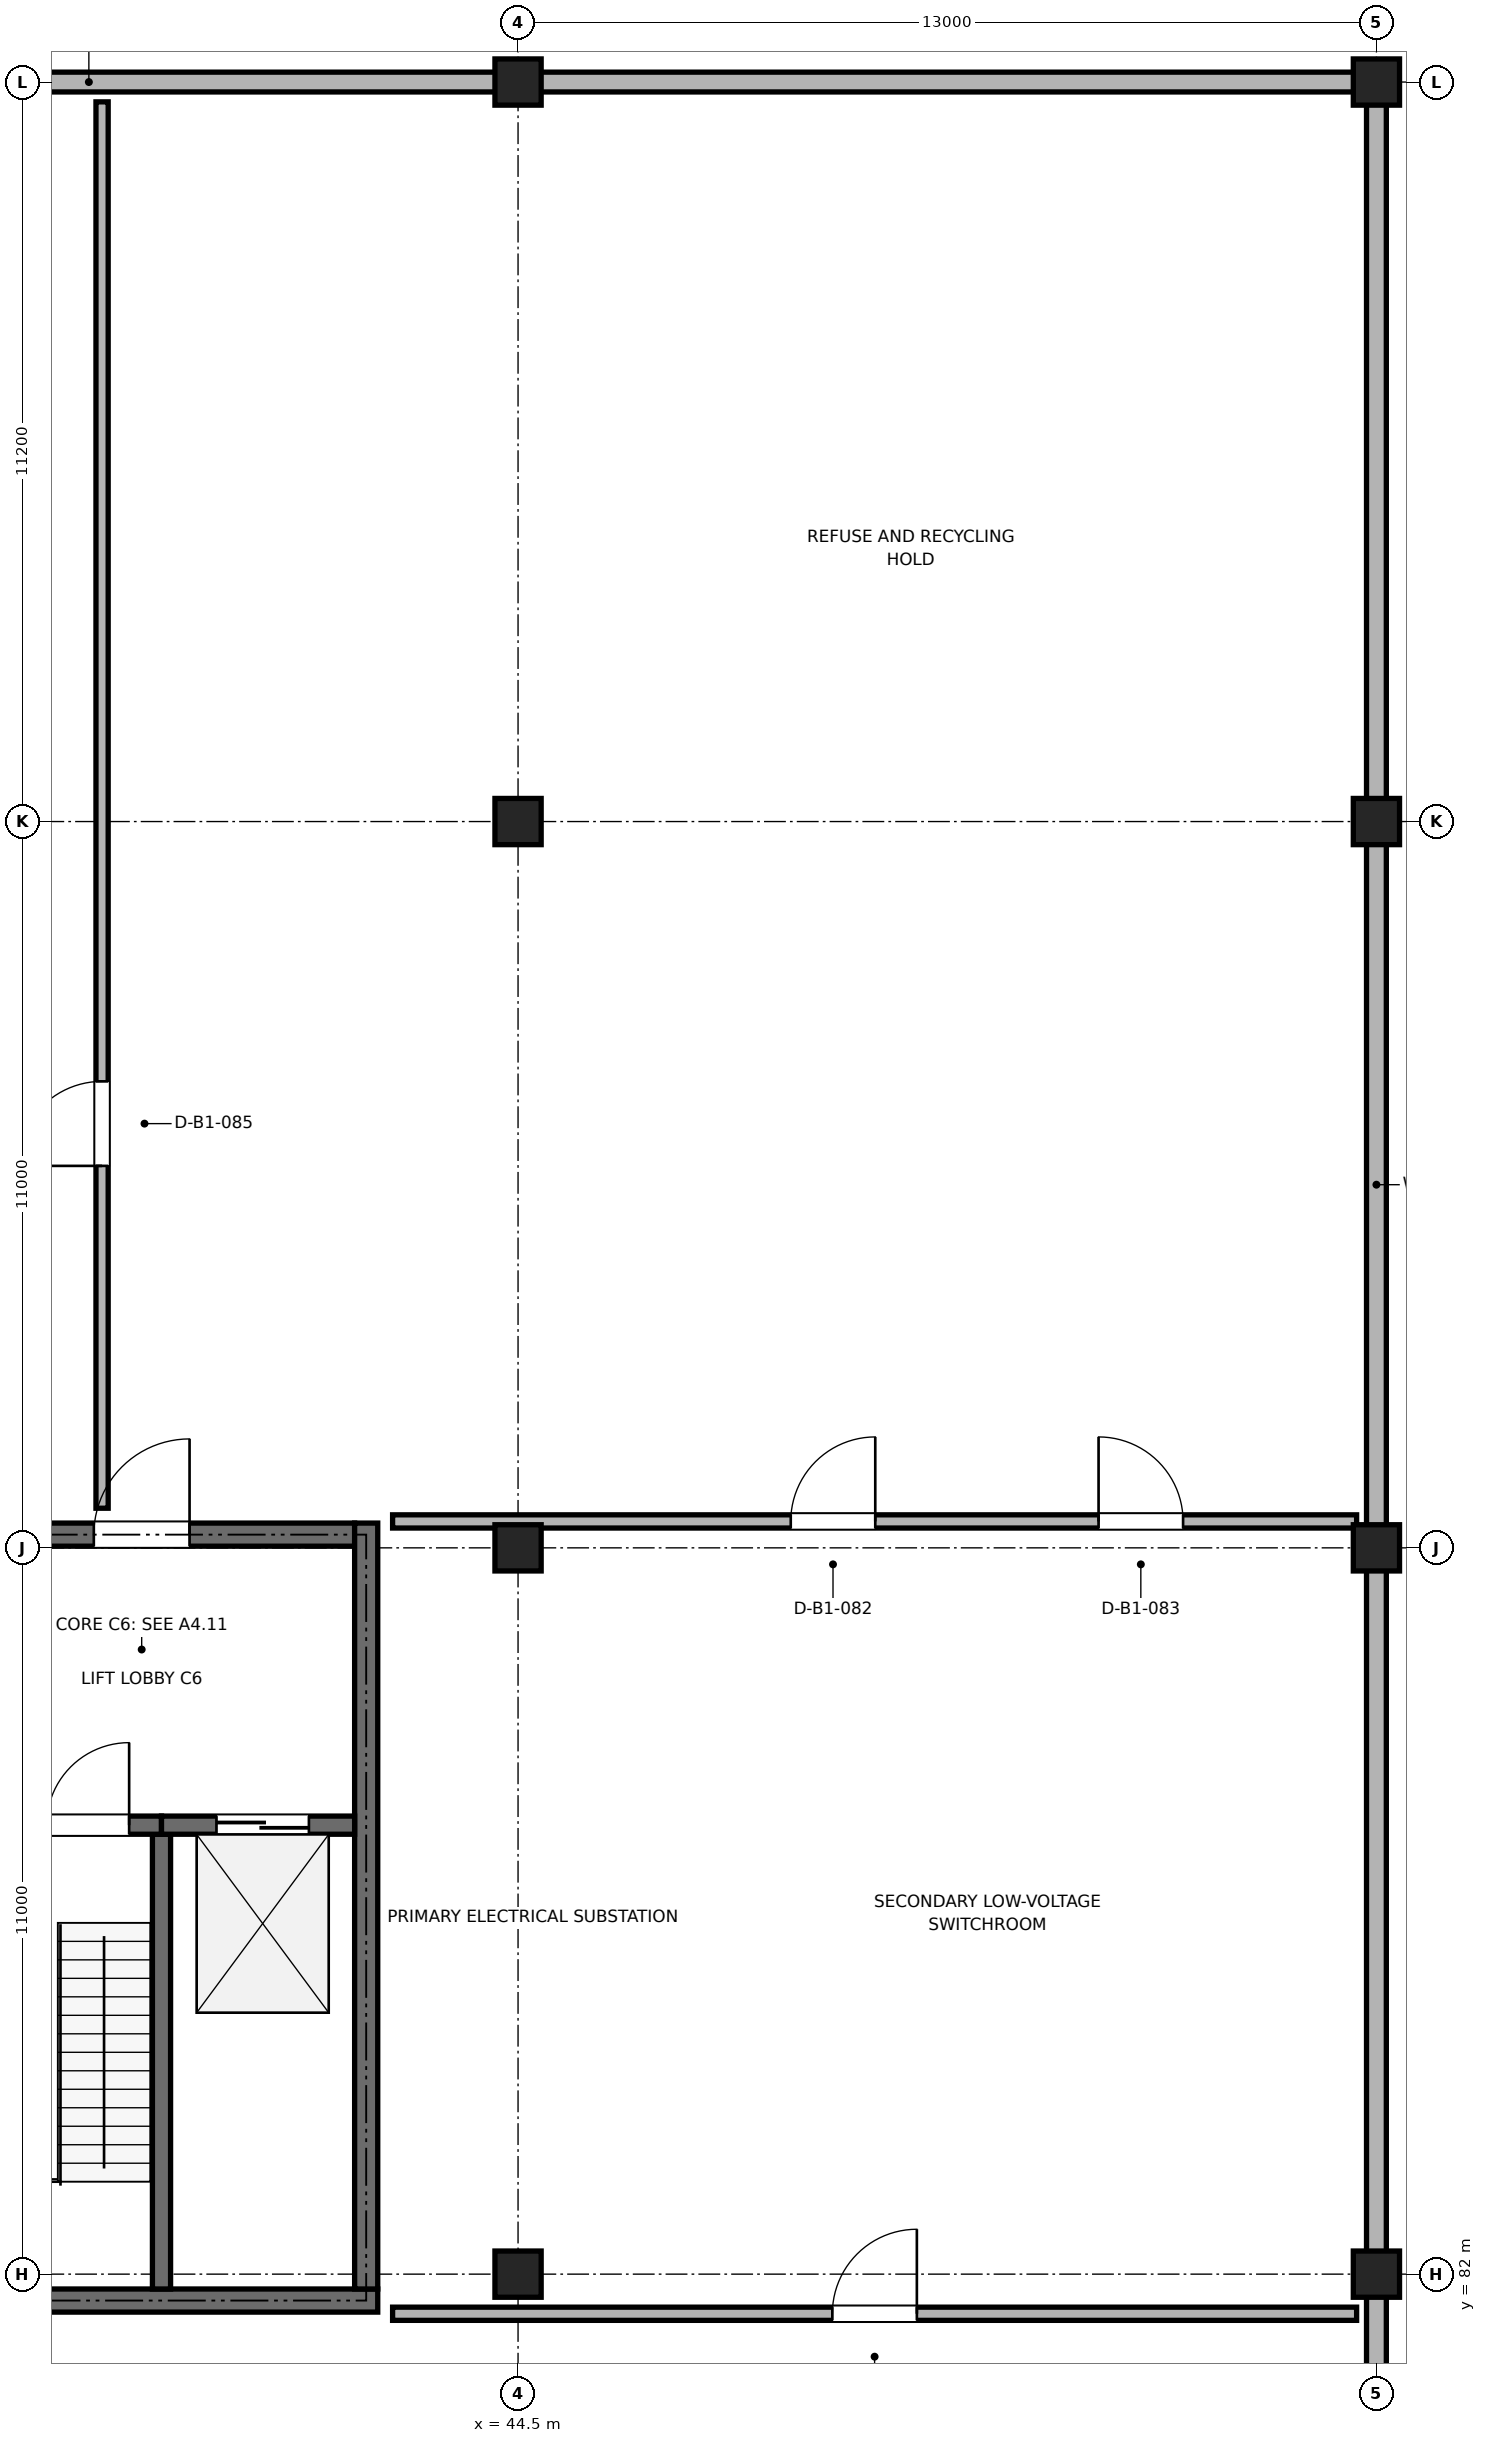
"""IFC4 building model, lengths in metres.
Left out: names, types, materials, properties, quantities, classifications, styles, units other than length and angle.
Written with IfcOpenShell. Run it as: python <this file> out.ifc"""

import sys

from ifc_helpers import new_model, si_unit, direction, frame, frame_2d, origin, origin_2d, place, context, subcontext, project, spatial, rectangle, extrude, element, fill, save


model = new_model("IFC4")
c1 = context("Model", 3, precision=1e-05, world=origin(), true_north=direction((0.0, 1.0)))
c2 = subcontext(c1, "Body", "Model", "MODEL_VIEW")
j1 = project(units=[si_unit("LENGTHUNIT", "METRE"), si_unit("PLANEANGLEUNIT", "RADIAN")], contexts=[c1])
p1 = place(None, origin())
s1 = spatial("IfcSite", under=j1, at=p1, CompositionType="ELEMENT")
p2 = place(p1, origin())
s2 = spatial("IfcBuilding", under=s1, at=p2, CompositionType="ELEMENT")
p3 = place(p2, frame((0.0, 0.0, -4.8)))
s3 = spatial("IfcBuildingStorey", under=s2, at=p3, CompositionType="ELEMENT", Elevation=-4.8)
for number, where, z_axis, x_axis in (
    (1, (44.5, 82.0, 0.0), (0.0, 0.0, 1.0), (1.0, 0.0, 0.0)),
    (2, (44.5, 93.0, 0.0), (0.0, 0.0, 1.0), (1.0, 0.0, 0.0)),
    (3, (44.5, 104.0, 0.0), (0.0, 0.0, 1.0), (1.0, 0.0, 0.0)),
    (4, (44.5, 115.2, 0.0), (0.0, 0.0, 1.0), (1.0, 0.0, 0.0)),
    (5, (57.5, 82.0, 0.0), (0.0, 0.0, 1.0), (1.0, 0.0, 0.0)),
    (6, (57.5, 93.0, 0.0), (0.0, 0.0, 1.0), (1.0, 0.0, 0.0)),
    (7, (57.5, 104.0, 0.0), (0.0, 0.0, 1.0), (1.0, 0.0, 0.0)),
    (8, (57.5, 115.2, 0.0), (0.0, 0.0, 1.0), (1.0, 0.0, 0.0)),
):
    element("IfcColumn", number, at=place(p3, frame(where, z_axis=z_axis, x_axis=x_axis)), inside=s3, PredefinedType="COLUMN", context=c2, shape_type="SweptSolid", body=[
        extrude(rectangle(XDim=0.7, YDim=0.7, at=origin_2d()), origin(), (0.0, 0.0, 1.0), 4.8),
    ])
for number, where, z_axis, x_axis in (
    (9, (57.5, 81.98, 0.0), (0.0, 0.0, 1.0), (0.0, -1.0, 0.0)),
    (10, (57.5, 92.98, 0.0), (0.0, 0.0, 1.0), (0.0, -1.0, 0.0)),
    (11, (57.5, 103.98, 0.0), (0.0, 0.0, 1.0), (0.0, -1.0, 0.0)),
):
    element("IfcWall", number, at=place(p3, frame(where, z_axis=z_axis, x_axis=x_axis)), inside=s3, PredefinedType="SOLIDWALL", context=c2, shape_type="SweptSolid", body=[
        extrude(rectangle(XDim=10.96, YDim=0.3, at=frame_2d((5.48, 0.0))), origin(), (0.0, 0.0, 1.0), 3.638),
    ])
p4 = place(p3, frame((57.5, 115.18, 0.0), z_axis=(0.0, 0.0, 1.0), x_axis=(0.0, -1.0, 0.0)))
e12 = element("IfcWall", 12, at=p4, inside=s3, PredefinedType="SOLIDWALL", context=c2, shape_type="SweptSolid", body=[
    extrude(rectangle(XDim=11.16, YDim=0.3, at=frame_2d((5.58, 0.0))), origin(), (0.0, 0.0, 1.0), 3.638),
])
for number, where, z_axis, x_axis in (
    (13, (44.52, 115.2, 0.0), (0.0, 0.0, 1.0), (1.0, 0.0, 0.0)),
    (14, (31.52, 115.2, 0.0), (0.0, 0.0, 1.0), (1.0, 0.0, 0.0)),
):
    element("IfcWall", number, at=place(p3, frame(where, z_axis=z_axis, x_axis=x_axis)), inside=s3, PredefinedType="SOLIDWALL", context=c2, shape_type="SweptSolid", body=[
        extrude(rectangle(XDim=12.96, YDim=0.3, at=frame_2d((6.48, 0.0))), origin(), (0.0, 0.0, 1.0), 3.638),
    ])
p5 = place(p3, frame((35.225, 81.6, 0.0), z_axis=(0.0, 0.0, 1.0), x_axis=(1.0, 0.0, 0.0)))
e15 = element("IfcWall", 15, at=p5, inside=s3, PredefinedType="SHEAR", context=c2, shape_type="SweptSolid", body=[
    extrude(rectangle(XDim=7.15, YDim=0.35, at=frame_2d((3.575, 0.0))), origin(), (0.0, 0.0, 1.0), 4.5),
])
p6 = place(p3, frame((35.575, 93.2, 0.0), z_axis=(0.0, 0.0, 1.0), x_axis=(1.0, 0.0, 0.0)))
e16 = element("IfcWall", 16, at=p6, inside=s3, PredefinedType="SHEAR", context=c2, shape_type="SweptSolid", body=[
    extrude(rectangle(XDim=6.45, YDim=0.35, at=frame_2d((3.225, 0.0))), origin(), (0.0, 0.0, 1.0), 4.5),
])
p7 = place(p6, frame((2.5, 0.0, 0.0)))
e17 = element("IfcOpeningElement", 17, at=p7, cuts=e16, PredefinedType="OPENING", context=c2, shape_type="SweptSolid", body=[
    extrude(rectangle(XDim=1.45, YDim=2.2, at=frame_2d((0.725, 1.1))), frame((0.0, 0.185, 0.0), z_axis=(0.0, -1.0, 0.0), x_axis=(1.0, 0.0, 0.0)), (0.0, 0.0, 1.0), 0.37),
])
p8 = place(p3, frame((42.2, 81.775, 0.0), z_axis=(0.0, 0.0, 1.0), x_axis=(0.0, 1.0, 0.0)))
e18 = element("IfcWall", 18, at=p8, inside=s3, PredefinedType="SHEAR", context=c2, shape_type="SweptSolid", body=[
    extrude(rectangle(XDim=11.6, YDim=0.35, at=frame_2d((5.8, 0.0))), origin(), (0.0, 0.0, 1.0), 4.5),
])
p9 = place(p3, frame((39.1, 81.775, 0.0), z_axis=(0.0, 0.0, 1.0), x_axis=(0.0, 1.0, 0.0)))
e19 = element("IfcWall", 19, at=p9, inside=s3, PredefinedType="SHEAR", context=c2, shape_type="SweptSolid", body=[
    extrude(rectangle(XDim=6.888, YDim=0.275, at=frame_2d((3.444, 0.0))), origin(), (0.0, 0.0, 1.0), 4.5),
])
p10 = place(p3, frame((35.575, 88.8, 0.0), z_axis=(0.0, 0.0, 1.0), x_axis=(1.0, 0.0, 0.0)))
e20 = element("IfcWall", 20, at=p10, inside=s3, PredefinedType="SHEAR", context=c2, shape_type="SweptSolid", body=[
    extrude(rectangle(XDim=3.525, YDim=0.275, at=frame_2d((1.763, 0.0))), origin(), (0.0, 0.0, 1.0), 4.5),
])
p11 = place(p10, frame((1.785, 0.0, 0.0)))
e21 = element("IfcOpeningElement", 21, at=p11, cuts=e20, PredefinedType="OPENING", context=c2, shape_type="SweptSolid", body=[
    extrude(rectangle(XDim=1.25, YDim=2.15, at=frame_2d((0.625, 1.075))), frame((0.0, 0.147, 0.0), z_axis=(0.0, -1.0, 0.0), x_axis=(1.0, 0.0, 0.0)), (0.0, 0.0, 1.0), 0.295),
])
p12 = place(p3, frame((39.1, 88.8, 0.0), z_axis=(0.0, 0.0, 1.0), x_axis=(1.0, 0.0, 0.0)))
e22 = element("IfcWall", 22, at=p12, inside=s3, PredefinedType="SHEAR", context=c2, shape_type="SweptSolid", body=[
    extrude(rectangle(XDim=2.925, YDim=0.275, at=frame_2d((1.462, 0.0))), origin(), (0.0, 0.0, 1.0), 4.5),
])
p13 = place(p12, frame((0.833, 0.0, 0.0)))
e23 = element("IfcOpeningElement", 23, at=p13, cuts=e22, PredefinedType="OPENING", context=c2, shape_type="SweptSolid", body=[
    extrude(rectangle(XDim=1.4, YDim=2.2, at=frame_2d((0.7, 1.1))), frame((0.0, 0.147, 0.0), z_axis=(0.0, -1.0, 0.0), x_axis=(1.0, 0.0, 0.0)), (0.0, 0.0, 1.0), 0.295),
])
p14 = place(p3, frame((42.6, 81.4, 0.0), z_axis=(0.0, 0.0, 1.0), x_axis=(1.0, 0.0, 0.0)))
e24 = element("IfcWall", 24, at=p14, inside=s3, PredefinedType="PARTITIONING", context=c2, shape_type="SweptSolid", body=[
    extrude(rectangle(XDim=14.6, YDim=0.2, at=frame_2d((7.3, 0.0))), origin(), (0.0, 0.0, 1.0), 3.64),
])
p15 = place(p14, frame((6.66, 0.0, 0.0)))
e25 = element("IfcOpeningElement", 25, at=p15, cuts=e24, PredefinedType="OPENING", context=c2, shape_type="SweptSolid", body=[
    extrude(rectangle(XDim=1.28, YDim=2.18, at=frame_2d((0.64, 1.09))), frame((0.0, 0.11, 0.0), z_axis=(0.0, -1.0, 0.0), x_axis=(1.0, 0.0, 0.0)), (0.0, 0.0, 1.0), 0.22),
])
p16 = place(p3, frame((42.6, 93.4, 0.0), z_axis=(0.0, 0.0, 1.0), x_axis=(1.0, 0.0, 0.0)))
e26 = element("IfcWall", 26, at=p16, inside=s3, PredefinedType="PARTITIONING", context=c2, shape_type="SweptSolid", body=[
    extrude(rectangle(XDim=14.6, YDim=0.2, at=frame_2d((7.3, 0.0))), origin(), (0.0, 0.0, 1.0), 3.64),
])
p17 = place(p16, frame((6.03, 0.0, 0.0)))
e27 = element("IfcOpeningElement", 27, at=p17, cuts=e26, PredefinedType="OPENING", context=c2, shape_type="SweptSolid", body=[
    extrude(rectangle(XDim=1.28, YDim=2.18, at=frame_2d((0.64, 1.09))), frame((0.0, 0.11, 0.0), z_axis=(0.0, -1.0, 0.0), x_axis=(1.0, 0.0, 0.0)), (0.0, 0.0, 1.0), 0.22),
])
p18 = place(p16, frame((10.692, 0.0, 0.0)))
e28 = element("IfcOpeningElement", 28, at=p18, cuts=e26, PredefinedType="OPENING", context=c2, shape_type="SweptSolid", body=[
    extrude(rectangle(XDim=1.28, YDim=2.18, at=frame_2d((0.64, 1.09))), frame((0.0, 0.11, 0.0), z_axis=(0.0, -1.0, 0.0), x_axis=(1.0, 0.0, 0.0)), (0.0, 0.0, 1.0), 0.22),
])
p19 = place(p3, frame((38.2, 93.6, 0.0), z_axis=(0.0, 0.0, 1.0), x_axis=(0.0, 1.0, 0.0)))
e29 = element("IfcWall", 29, at=p19, inside=s3, PredefinedType="PARTITIONING", context=c2, shape_type="SweptSolid", body=[
    extrude(rectangle(XDim=21.3, YDim=0.185, at=frame_2d((10.65, 0.0))), origin(), (0.0, 0.0, 1.0), 3.54),
])
p20 = place(p19, frame((5.185, 0.0, 0.0)))
e30 = element("IfcOpeningElement", 30, at=p20, cuts=e29, PredefinedType="OPENING", context=c2, shape_type="SweptSolid", body=[
    extrude(rectangle(XDim=1.28, YDim=2.18, at=frame_2d((0.64, 1.09))), frame((0.0, 0.103, 0.0), z_axis=(0.0, -1.0, 0.0), x_axis=(1.0, 0.0, 0.0)), (0.0, 0.0, 1.0), 0.205),
])
p21 = place(p11, origin())
e31 = element("IfcDoor", 31, at=p21, inside=s3, OperationType="SINGLE_SWING_RIGHT", PredefinedType="DOOR", context=c2, shape_type="SweptSolid", body=[
    extrude(rectangle(XDim=1.25, YDim=2.15, at=frame_2d((0.625, 1.075))), frame((0.0, 0.025, 0.0), z_axis=(0.0, -1.0, 0.0), x_axis=(1.0, 0.0, 0.0)), (0.0, 0.0, 1.0), 0.05),
])
fill(e21, e31)
p22 = place(p13, origin())
e32 = element("IfcDoor", 32, at=p22, inside=s3, OperationType="DOUBLE_DOOR_SLIDING", PredefinedType="DOOR", context=c2, shape_type="SweptSolid", body=[
    extrude(rectangle(XDim=1.4, YDim=2.2, at=frame_2d((0.7, 1.1))), frame((0.0, 0.025, 0.0), z_axis=(0.0, -1.0, 0.0), x_axis=(1.0, 0.0, 0.0)), (0.0, 0.0, 1.0), 0.05),
])
fill(e23, e32)
p23 = place(p7, origin())
e33 = element("IfcDoor", 33, at=p23, inside=s3, OperationType="SINGLE_SWING_RIGHT", PredefinedType="DOOR", context=c2, shape_type="SweptSolid", body=[
    extrude(rectangle(XDim=1.45, YDim=2.2, at=frame_2d((0.725, 1.1))), frame((0.0, 0.025, 0.0), z_axis=(0.0, -1.0, 0.0), x_axis=(1.0, 0.0, 0.0)), (0.0, 0.0, 1.0), 0.05),
])
fill(e17, e33)
p24 = place(p15, origin())
e34 = element("IfcDoor", 34, at=p24, inside=s3, OperationType="SINGLE_SWING_RIGHT", PredefinedType="DOOR", context=c2, shape_type="SweptSolid", body=[
    extrude(rectangle(XDim=1.28, YDim=2.18, at=frame_2d((0.64, 1.09))), frame((0.0, 0.025, 0.0), z_axis=(0.0, -1.0, 0.0), x_axis=(1.0, 0.0, 0.0)), (0.0, 0.0, 1.0), 0.05),
])
fill(e25, e34)
p25 = place(p17, origin())
e35 = element("IfcDoor", 35, at=p25, inside=s3, OperationType="SINGLE_SWING_RIGHT", PredefinedType="DOOR", context=c2, shape_type="SweptSolid", body=[
    extrude(rectangle(XDim=1.28, YDim=2.18, at=frame_2d((0.64, 1.09))), frame((0.0, 0.025, 0.0), z_axis=(0.0, -1.0, 0.0), x_axis=(1.0, 0.0, 0.0)), (0.0, 0.0, 1.0), 0.05),
])
fill(e27, e35)
p26 = place(p18, origin())
e36 = element("IfcDoor", 36, at=p26, inside=s3, OperationType="SINGLE_SWING_LEFT", PredefinedType="DOOR", context=c2, shape_type="SweptSolid", body=[
    extrude(rectangle(XDim=1.28, YDim=2.18, at=frame_2d((0.64, 1.09))), frame((0.0, 0.025, 0.0), z_axis=(0.0, -1.0, 0.0), x_axis=(1.0, 0.0, 0.0)), (0.0, 0.0, 1.0), 0.05),
])
fill(e28, e36)
p27 = place(p20, origin())
e37 = element("IfcDoor", 37, at=p27, inside=s3, OperationType="SINGLE_SWING_LEFT", PredefinedType="DOOR", context=c2, shape_type="SweptSolid", body=[
    extrude(rectangle(XDim=1.28, YDim=2.18, at=frame_2d((0.64, 1.09))), frame((0.0, 0.025, 0.0), z_axis=(0.0, -1.0, 0.0), x_axis=(1.0, 0.0, 0.0)), (0.0, 0.0, 1.0), 0.05),
])
fill(e30, e37)
save(model, sys.argv[1])
